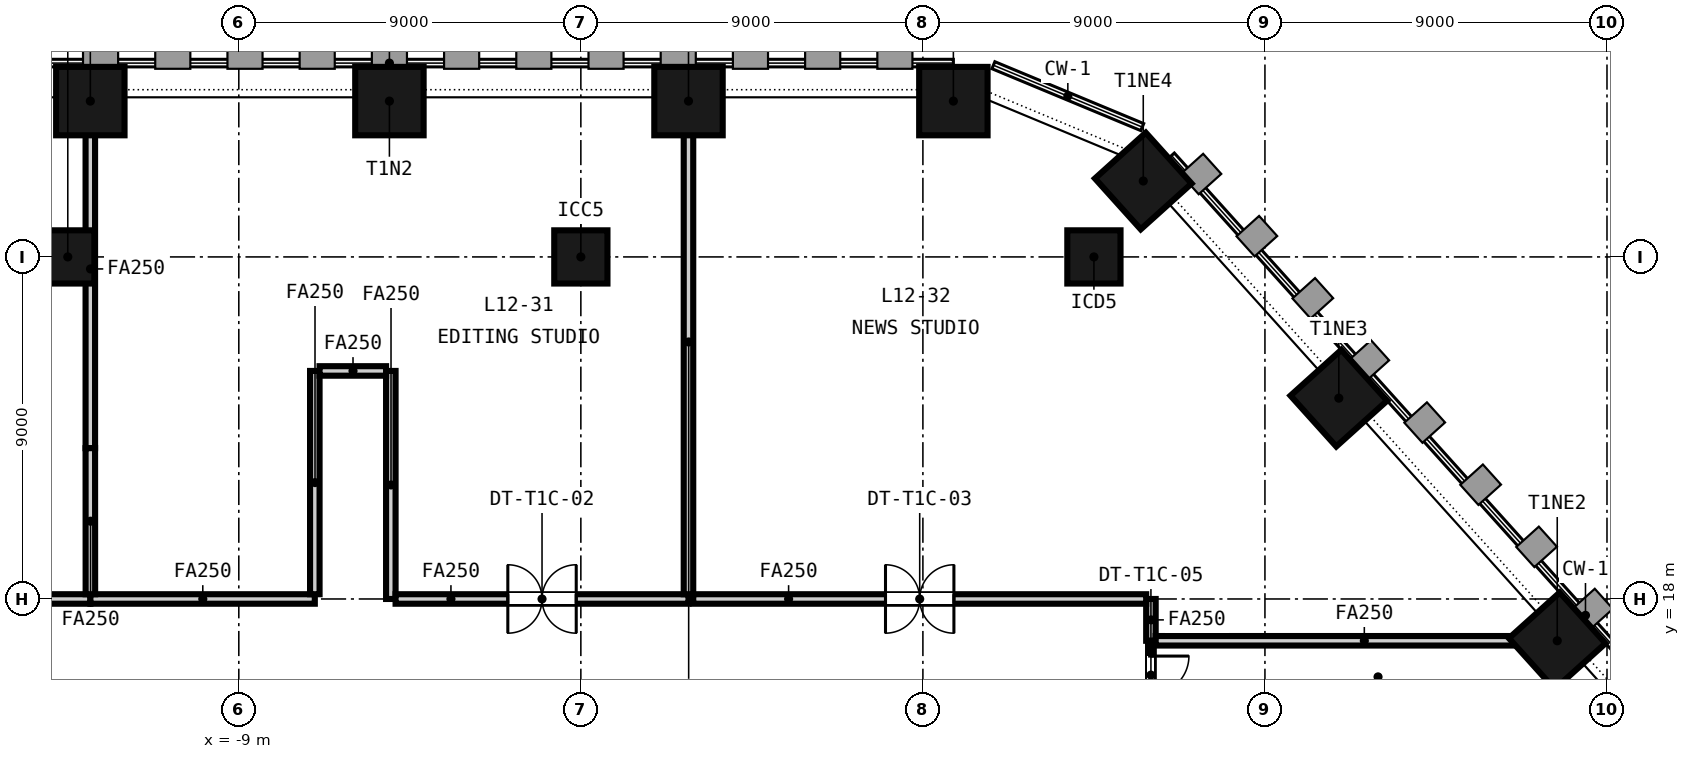
"""IFC4 building model, lengths in metres.
Left out: names, types, materials, properties, quantities, classifications, styles, units other than length and angle.
Written with IfcOpenShell. Run it as: python <this file> out.ifc"""

import sys

from ifc_helpers import new_model, si_unit, direction, frame, frame_2d, origin, origin_2d, place, context, subcontext, project, spatial, rectangle, extrude, element, fill, save


model = new_model("IFC4")
c1 = context("Model", 3, precision=1e-05, world=origin(), true_north=direction((0.0, 1.0)))
c2 = subcontext(c1, "Body", "Model", "MODEL_VIEW")
j1 = project(units=[si_unit("LENGTHUNIT", "METRE"), si_unit("PLANEANGLEUNIT", "RADIAN")], contexts=[c1])
p1 = place(None, origin())
s1 = spatial("IfcSite", under=j1, at=p1, CompositionType="ELEMENT")
p2 = place(p1, origin())
s2 = spatial("IfcBuilding", under=s1, at=p2, CompositionType="ELEMENT")
p3 = place(p2, frame((0.0, 0.0, 57.9)))
s3 = spatial("IfcBuildingStorey", under=s2, at=p3, CompositionType="ELEMENT", Elevation=57.9)
for number, where, z_axis, x_axis in (
    (1, (9.802, 31.1, -0.15), (0.0, 0.0, 1.0), (-1.0, 0.0, 0.0)),
    (2, (2.832, 31.1, -0.15), (0.0, 0.0, 1.0), (-1.0, 0.0, 0.0)),
    (3, (-5.037, 31.1, -0.15), (0.0, 0.0, 1.0), (-1.0, 0.0, 0.0)),
    (4, (-12.907, 31.1, -0.15), (0.0, 0.0, 1.0), (-1.0, 0.0, 0.0)),
    (5, (25.691, 16.9, -0.15), (0.0, 0.0, 1.0), (-0.669, 0.743, 0.0)),
    (6, (19.944, 23.283, -0.15), (0.0, 0.0, 1.0), (-0.669, 0.743, 0.0)),
    (7, (14.799, 28.998, -0.15), (0.0, 0.0, 1.0), (-0.669, 0.743, 0.0)),
):
    element("IfcColumn", number, at=place(p3, frame(where, z_axis=z_axis, x_axis=x_axis)), inside=s3, PredefinedType="COLUMN", context=c2, shape_type="SweptSolid", body=[
        extrude(rectangle(XDim=1.8, YDim=1.8, at=origin_2d()), origin(), (0.0, 0.0, 1.0), 3.65),
    ])
for number, where, z_axis, x_axis in (
    (8, (-13.5, 27.0, -0.15), (0.0, 0.0, 1.0), (1.0, 0.0, 0.0)),
    (9, (0.0, 27.0, -0.15), (0.0, 0.0, 1.0), (1.0, 0.0, 0.0)),
    (10, (13.5, 27.0, -0.15), (0.0, 0.0, 1.0), (1.0, 0.0, 0.0)),
):
    element("IfcColumn", number, at=place(p3, frame(where, z_axis=z_axis, x_axis=x_axis)), inside=s3, PredefinedType="COLUMN", context=c2, shape_type="SweptSolid", body=[
        extrude(rectangle(XDim=1.4, YDim=1.4, at=origin_2d()), origin(), (0.0, 0.0, 1.0), 3.65),
    ])
p4 = place(p3, frame((-5.0, 24.0, 0.0), z_axis=(0.0, 0.0, 1.0), x_axis=(0.0, -1.0, 0.0)))
e11 = element("IfcWall", 11, at=p4, inside=s3, PredefinedType="PARTITIONING", context=c2, shape_type="SweptSolid", body=[
    extrude(rectangle(XDim=6.0, YDim=0.25, at=frame_2d((3.0, 0.0))), origin(), (0.0, 0.0, 1.0), 2.741),
])
p5 = place(p3, frame((15.0, 18.0, 0.0), z_axis=(0.0, 0.0, 1.0), x_axis=(0.0, -1.0, 0.0)))
e12 = element("IfcWall", 12, at=p5, inside=s3, PredefinedType="PARTITIONING", context=c2, shape_type="SweptSolid", body=[
    extrude(rectangle(XDim=1.1, YDim=0.25, at=frame_2d((0.55, 0.0))), origin(), (0.0, 0.0, 1.0), 2.741),
])
p6 = place(p3, frame((15.0, 16.9, 0.0), z_axis=(0.0, 0.0, 1.0), x_axis=(0.0, -1.0, 0.0)))
e13 = element("IfcWall", 13, at=p6, inside=s3, PredefinedType="PARTITIONING", context=c2, shape_type="SweptSolid", body=[
    extrude(rectangle(XDim=1.9, YDim=0.15, at=frame_2d((0.95, 0.0))), origin(), (0.0, 0.0, 1.0), 2.741),
])
p7 = place(p6, frame((0.403, 0.0, 0.0)))
e14 = element("IfcOpeningElement", 14, at=p7, cuts=e13, PredefinedType="OPENING", context=c2, shape_type="SweptSolid", body=[
    extrude(rectangle(XDim=1.0, YDim=2.1, at=frame_2d((0.5, 1.05))), frame((0.0, 0.085, 0.0), z_axis=(0.0, -1.0, 0.0), x_axis=(1.0, 0.0, 0.0)), (0.0, 0.0, 1.0), 0.17),
])
p8 = place(p3, frame((-23.683, 18.002, 0.0), z_axis=(0.0, 0.0, 1.0), x_axis=(0.999999983581, -0.000181212763, 0.0)))
e15 = element("IfcWall", 15, at=p8, inside=s3, PredefinedType="PARTITIONING", context=c2, shape_type="SweptSolid", body=[
    extrude(rectangle(XDim=10.778, YDim=0.25, at=frame_2d((5.389, 0.0))), origin(), (0.0, 0.0, 1.0), 2.741),
])
p9 = place(p8, frame((4.489, 0.0, 0.0)))
e16 = element("IfcOpeningElement", 16, at=p9, cuts=e15, PredefinedType="OPENING", context=c2, shape_type="SweptSolid", body=[
    extrude(rectangle(XDim=1.8, YDim=2.1, at=frame_2d((0.9, 1.05))), frame((0.0, 0.135, 0.0), z_axis=(0.0, -1.0, 0.0), x_axis=(1.0, 0.0, 0.0)), (0.0, 0.0, 1.0), 0.27),
])
p10 = place(p3, frame((-12.907, 21.968, 0.0), z_axis=(0.0, 0.0, 1.0), x_axis=(0.0, 1.0, 0.0)))
e17 = element("IfcWall", 17, at=p10, inside=s3, PredefinedType="PARTITIONING", context=c2, shape_type="SweptSolid", body=[
    extrude(rectangle(XDim=9.432, YDim=0.25, at=frame_2d((4.716, 0.0))), origin(), (0.0, 0.0, 1.0), 2.741),
])
p11 = place(p3, frame((-12.905, 18.0, 0.0), z_axis=(0.0, 0.0, 1.0), x_axis=(1.0, 0.0, 0.0)))
e18 = element("IfcWall", 18, at=p11, inside=s3, PredefinedType="PARTITIONING", context=c2, shape_type="SweptSolid", body=[
    extrude(rectangle(XDim=5.905, YDim=0.25, at=frame_2d((2.953, 0.0))), origin(), (0.0, 0.0, 1.0), 2.741),
])
p12 = place(p3, frame((-7.0, 18.125, 0.0), z_axis=(0.0, 0.0, 1.0), x_axis=(0.0, 1.0, 0.0)))
e19 = element("IfcWall", 19, at=p12, inside=s3, PredefinedType="PARTITIONING", context=c2, shape_type="SweptSolid", body=[
    extrude(rectangle(XDim=5.875, YDim=0.25, at=frame_2d((2.938, 0.0))), origin(), (0.0, 0.0, 1.0), 2.741),
])
p13 = place(p3, frame((-6.875, 24.0, 0.0), z_axis=(0.0, 0.0, 1.0), x_axis=(1.0, 0.0, 0.0)))
e20 = element("IfcWall", 20, at=p13, inside=s3, PredefinedType="PARTITIONING", context=c2, shape_type="SweptSolid", body=[
    extrude(rectangle(XDim=1.75, YDim=0.25, at=frame_2d((0.875, 0.0))), origin(), (0.0, 0.0, 1.0), 2.741),
])
p14 = place(p3, frame((-4.875, 18.0, 0.0), z_axis=(0.0, 0.0, 1.0), x_axis=(1.0, 0.0, 0.0)))
e21 = element("IfcWall", 21, at=p14, inside=s3, PredefinedType="PARTITIONING", context=c2, shape_type="SweptSolid", body=[
    extrude(rectangle(XDim=7.707, YDim=0.25, at=frame_2d((3.854, 0.0))), origin(), (0.0, 0.0, 1.0), 2.741),
])
p15 = place(p14, frame((2.954, 0.0, 0.0)))
e22 = element("IfcOpeningElement", 22, at=p15, cuts=e21, PredefinedType="OPENING", context=c2, shape_type="SweptSolid", body=[
    extrude(rectangle(XDim=1.8, YDim=2.1, at=frame_2d((0.9, 1.05))), frame((0.0, 0.135, 0.0), z_axis=(0.0, -1.0, 0.0), x_axis=(1.0, 0.0, 0.0)), (0.0, 0.0, 1.0), 0.27),
])
p16 = place(p3, frame((-12.907, 21.968, 0.0), z_axis=(0.0, 0.0, 1.0), x_axis=(0.000508226858, -0.999999870853, 0.0)))
e23 = element("IfcWall", 23, at=p16, inside=s3, PredefinedType="PARTITIONING", context=c2, shape_type="SweptSolid", body=[
    extrude(rectangle(XDim=3.843, YDim=0.25, at=frame_2d((1.921, 0.0))), origin(), (0.0, 0.0, 1.0), 2.741),
])
p17 = place(p3, frame((2.832, 18.125, 0.0), z_axis=(0.0, 0.0, 1.0), x_axis=(0.0, 1.0, 0.0)))
e24 = element("IfcWall", 24, at=p17, inside=s3, PredefinedType="PARTITIONING", context=c2, shape_type="SweptSolid", body=[
    extrude(rectangle(XDim=13.275, YDim=0.25, at=frame_2d((6.637, 0.0))), origin(), (0.0, 0.0, 1.0), 2.741),
])
p18 = place(p3, frame((2.957, 18.0, 0.0), z_axis=(0.0, 0.0, 1.0), x_axis=(1.0, 0.0, 0.0)))
e25 = element("IfcWall", 25, at=p18, inside=s3, PredefinedType="PARTITIONING", context=c2, shape_type="SweptSolid", body=[
    extrude(rectangle(XDim=11.918, YDim=0.25, at=frame_2d((5.959, 0.0))), origin(), (0.0, 0.0, 1.0), 2.741),
])
p19 = place(p18, frame((5.059, 0.0, 0.0)))
e26 = element("IfcOpeningElement", 26, at=p19, cuts=e25, PredefinedType="OPENING", context=c2, shape_type="SweptSolid", body=[
    extrude(rectangle(XDim=1.8, YDim=2.1, at=frame_2d((0.9, 1.05))), frame((0.0, 0.135, 0.0), z_axis=(0.0, -1.0, 0.0), x_axis=(1.0, 0.0, 0.0)), (0.0, 0.0, 1.0), 0.27),
])
p20 = place(p3, frame((15.125, 16.9, 0.0), z_axis=(0.0, 0.0, 1.0), x_axis=(1.0, 0.0, 0.0)))
e27 = element("IfcWall", 27, at=p20, inside=s3, PredefinedType="PARTITIONING", context=c2, shape_type="SweptSolid", body=[
    extrude(rectangle(XDim=10.97, YDim=0.25, at=frame_2d((5.485, 0.0))), origin(), (0.0, 0.0, 1.0), 2.741),
])
p21 = place(p15, origin())
e28 = element("IfcDoor", 28, at=p21, inside=s3, OperationType="DOUBLE_DOOR_DOUBLE_SWING", PredefinedType="DOOR", context=c2, shape_type="SweptSolid", body=[
    extrude(rectangle(XDim=1.8, YDim=2.1, at=frame_2d((0.9, 1.05))), frame((0.0, 0.025, 0.0), z_axis=(0.0, -1.0, 0.0), x_axis=(1.0, 0.0, 0.0)), (0.0, 0.0, 1.0), 0.05),
])
fill(e22, e28)
p22 = place(p19, origin())
e29 = element("IfcDoor", 29, at=p22, inside=s3, OperationType="DOUBLE_DOOR_DOUBLE_SWING", PredefinedType="DOOR", context=c2, shape_type="SweptSolid", body=[
    extrude(rectangle(XDim=1.8, YDim=2.1, at=frame_2d((0.9, 1.05))), frame((0.0, 0.025, 0.0), z_axis=(0.0, -1.0, 0.0), x_axis=(1.0, 0.0, 0.0)), (0.0, 0.0, 1.0), 0.05),
])
fill(e26, e29)
p23 = place(p7, origin())
e30 = element("IfcDoor", 30, at=p23, inside=s3, OperationType="SINGLE_SWING_LEFT", PredefinedType="DOOR", context=c2, shape_type="SweptSolid", body=[
    extrude(rectangle(XDim=1.0, YDim=2.1, at=frame_2d((0.5, 1.05))), frame((0.0, 0.025, 0.0), z_axis=(0.0, -1.0, 0.0), x_axis=(1.0, 0.0, 0.0)), (0.0, 0.0, 1.0), 0.05),
])
fill(e14, e30)
save(model, sys.argv[1])
